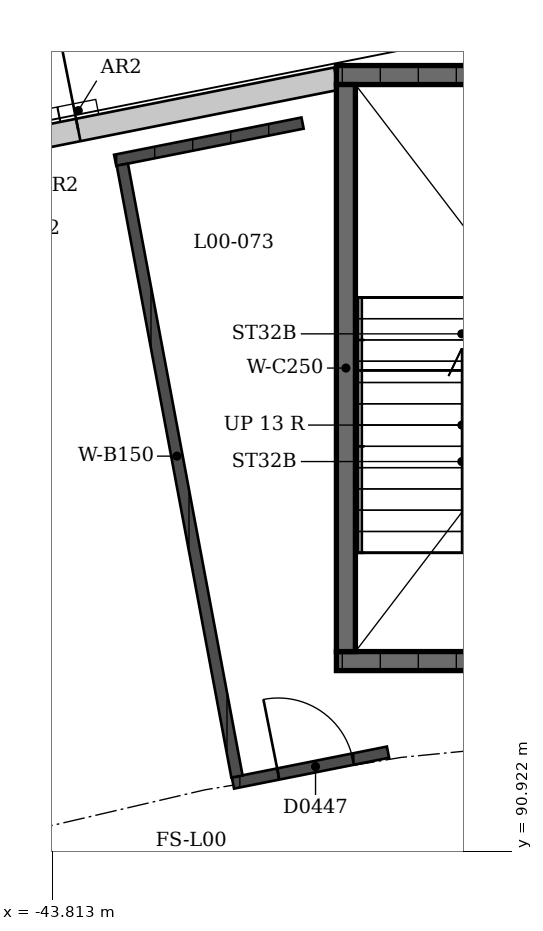
"""IFC4 building model, lengths in metres.
Left out: names, types, materials, properties, quantities, classifications, styles, units other than length and angle.
Written with IfcOpenShell. Run it as: python <this file> out.ifc"""

import sys

from ifc_helpers import new_model, si_unit, direction, frame, frame_2d, origin, place, context, subcontext, project, spatial, rectangle, extrude, element, fill, save


model = new_model("IFC4")
c1 = context("Model", 3, precision=1e-05, world=origin(), true_north=direction((0.0, 1.0)))
c2 = subcontext(c1, "Body", "Model", "MODEL_VIEW")
j1 = project(units=[si_unit("LENGTHUNIT", "METRE"), si_unit("PLANEANGLEUNIT", "RADIAN")], contexts=[c1])
p1 = place(None, origin())
s1 = spatial("IfcSite", under=j1, at=p1, CompositionType="ELEMENT")
p2 = place(p1, origin())
s2 = spatial("IfcBuilding", under=s1, at=p2, CompositionType="ELEMENT")
p3 = place(p2, origin())
s3 = spatial("IfcBuildingStorey", under=s2, at=p3, CompositionType="ELEMENT", Elevation=0.0)
p4 = place(p3, frame((-52.506, 98.615, 0.0), z_axis=(0.0, 0.0, 1.0), x_axis=(0.980786090948, 0.195086247086, 0.0)))
e1 = element("IfcWall", 1, at=p4, inside=s3, PredefinedType="SOLIDWALL", context=c2, shape_type="SweptSolid", body=[
    extrude(rectangle(XDim=12.675, YDim=0.3, at=frame_2d((6.337, 0.0))), origin(), (0.0, 0.0, 1.0), 2.79),
])
p5 = place(p4, frame((4.412, 0.0, 0.0)))
e2 = element("IfcOpeningElement", 2, at=p5, cuts=e1, PredefinedType="OPENING", context=c2, shape_type="SweptSolid", body=[
    extrude(rectangle(XDim=4.8, YDim=2.4, at=frame_2d((2.4, 1.2))), frame((0.0, 0.16, 0.0), z_axis=(0.0, -1.0, 0.0), x_axis=(1.0, 0.0, 0.0)), (0.0, 0.0, 1.0), 0.32),
])
p6 = place(p3, frame((-27.925, 93.425, 0.0), z_axis=(0.0, 0.0, 1.0), x_axis=(-1.0, 0.0, 0.0)))
e3 = element("IfcWall", 3, at=p6, inside=s3, PredefinedType="SHEAR", context=c2, shape_type="SweptSolid", body=[
    extrude(rectangle(XDim=12.15, YDim=0.25, at=frame_2d((6.075, 0.0))), origin(), (0.0, 0.0, 1.0), 4.09),
])
p7 = place(p6, frame((2.2, 0.0, 0.0)))
e4 = element("IfcOpeningElement", 4, at=p7, cuts=e3, PredefinedType="OPENING", context=c2, shape_type="SweptSolid", body=[
    extrude(rectangle(XDim=1.8, YDim=2.1, at=frame_2d((0.9, 1.05))), frame((0.0, 0.125, 0.0), z_axis=(0.0, -1.0, 0.0), x_axis=(1.0, 0.0, 0.0)), (0.0, 0.0, 1.0), 0.25),
])
p8 = place(p6, frame((8.15, 0.0, 0.0)))
e5 = element("IfcOpeningElement", 5, at=p8, cuts=e3, PredefinedType="OPENING", context=c2, shape_type="SweptSolid", body=[
    extrude(rectangle(XDim=1.8, YDim=2.1, at=frame_2d((0.9, 1.05))), frame((0.0, 0.125, 0.0), z_axis=(0.0, -1.0, 0.0), x_axis=(1.0, 0.0, 0.0)), (0.0, 0.0, 1.0), 0.25),
])
p9 = place(p3, frame((-27.925, 101.135, 0.0), z_axis=(0.0, 0.0, 1.0), x_axis=(-1.0, 0.0, 0.0)))
e6 = element("IfcWall", 6, at=p9, inside=s3, PredefinedType="SHEAR", context=c2, shape_type="SweptSolid", body=[
    extrude(rectangle(XDim=12.15, YDim=0.25, at=frame_2d((6.075, 0.0))), origin(), (0.0, 0.0, 1.0), 4.09),
])
p10 = place(p3, frame((-39.95, 93.55, 0.0), z_axis=(0.0, 0.0, 1.0), x_axis=(0.0, 1.0, 0.0)))
e7 = element("IfcWall", 7, at=p10, inside=s3, PredefinedType="SHEAR", context=c2, shape_type="SweptSolid", body=[
    extrude(rectangle(XDim=7.46, YDim=0.25, at=frame_2d((3.73, 0.0))), origin(), (0.0, 0.0, 1.0), 4.09),
])
p11 = place(p3, frame((-39.396, 92.227, 0.0), z_axis=(0.0, 0.0, 1.0), x_axis=(-0.980792255889, -0.195055250603, 0.0)))
e8 = element("IfcWall", 8, at=p11, inside=s3, PredefinedType="SOLIDWALL", context=c2, shape_type="SweptSolid", body=[
    extrude(rectangle(XDim=2.08, YDim=0.15, at=frame_2d((1.04, 0.0))), origin(), (0.0, 0.0, 1.0), 3.0),
])
p12 = place(p11, frame((0.472, 0.0, 0.0)))
e9 = element("IfcOpeningElement", 9, at=p12, cuts=e8, PredefinedType="OPENING", context=c2, shape_type="SweptSolid", body=[
    extrude(rectangle(XDim=1.0, YDim=2.1, at=frame_2d((0.5, 1.05))), frame((0.0, 0.075, 0.0), z_axis=(0.0, -1.0, 0.0), x_axis=(1.0, 0.0, 0.0)), (0.0, 0.0, 1.0), 0.15),
])
p13 = place(p3, frame((-40.52, 100.503, 0.0), z_axis=(0.0, 0.0, 1.0), x_axis=(-0.980796747004, -0.195032666665, 0.0)))
e10 = element("IfcWall", 10, at=p13, inside=s3, PredefinedType="SOLIDWALL", context=c2, shape_type="SweptSolid", body=[
    extrude(rectangle(XDim=2.514, YDim=0.15, at=frame_2d((1.257, 0.0))), origin(), (0.0, 0.0, 1.0), 3.0),
])
p14 = place(p3, frame((-41.383, 91.906, 0.0), z_axis=(0.0, 0.0, 1.0), x_axis=(-0.184160747979, 0.982896138411, 0.0)))
e11 = element("IfcWall", 11, at=p14, inside=s3, PredefinedType="SOLIDWALL", context=c2, shape_type="SweptSolid", body=[
    extrude(rectangle(XDim=8.19, YDim=0.15, at=frame_2d((4.095, 0.0))), origin(), (0.0, 0.0, 1.0), 3.0),
])
p15 = place(p5, origin())
e12 = element("IfcDoor", 12, at=p15, inside=s3, OperationType="DOUBLE_DOOR_SINGLE_SWING", PredefinedType="DOOR", context=c2, shape_type="SweptSolid", body=[
    extrude(rectangle(XDim=4.8, YDim=2.4, at=frame_2d((2.4, 1.2))), frame((0.0, 0.025, 0.0), z_axis=(0.0, -1.0, 0.0), x_axis=(1.0, 0.0, 0.0)), (0.0, 0.0, 1.0), 0.05),
])
fill(e2, e12)
p16 = place(p12, origin())
e13 = element("IfcDoor", 13, at=p16, inside=s3, OperationType="SINGLE_SWING_RIGHT", PredefinedType="DOOR", context=c2, shape_type="SweptSolid", body=[
    extrude(rectangle(XDim=1.0, YDim=2.1, at=frame_2d((0.5, 1.05))), frame((0.0, 0.025, 0.0), z_axis=(0.0, -1.0, 0.0), x_axis=(1.0, 0.0, 0.0)), (0.0, 0.0, 1.0), 0.05),
])
fill(e9, e13)
save(model, sys.argv[1])
